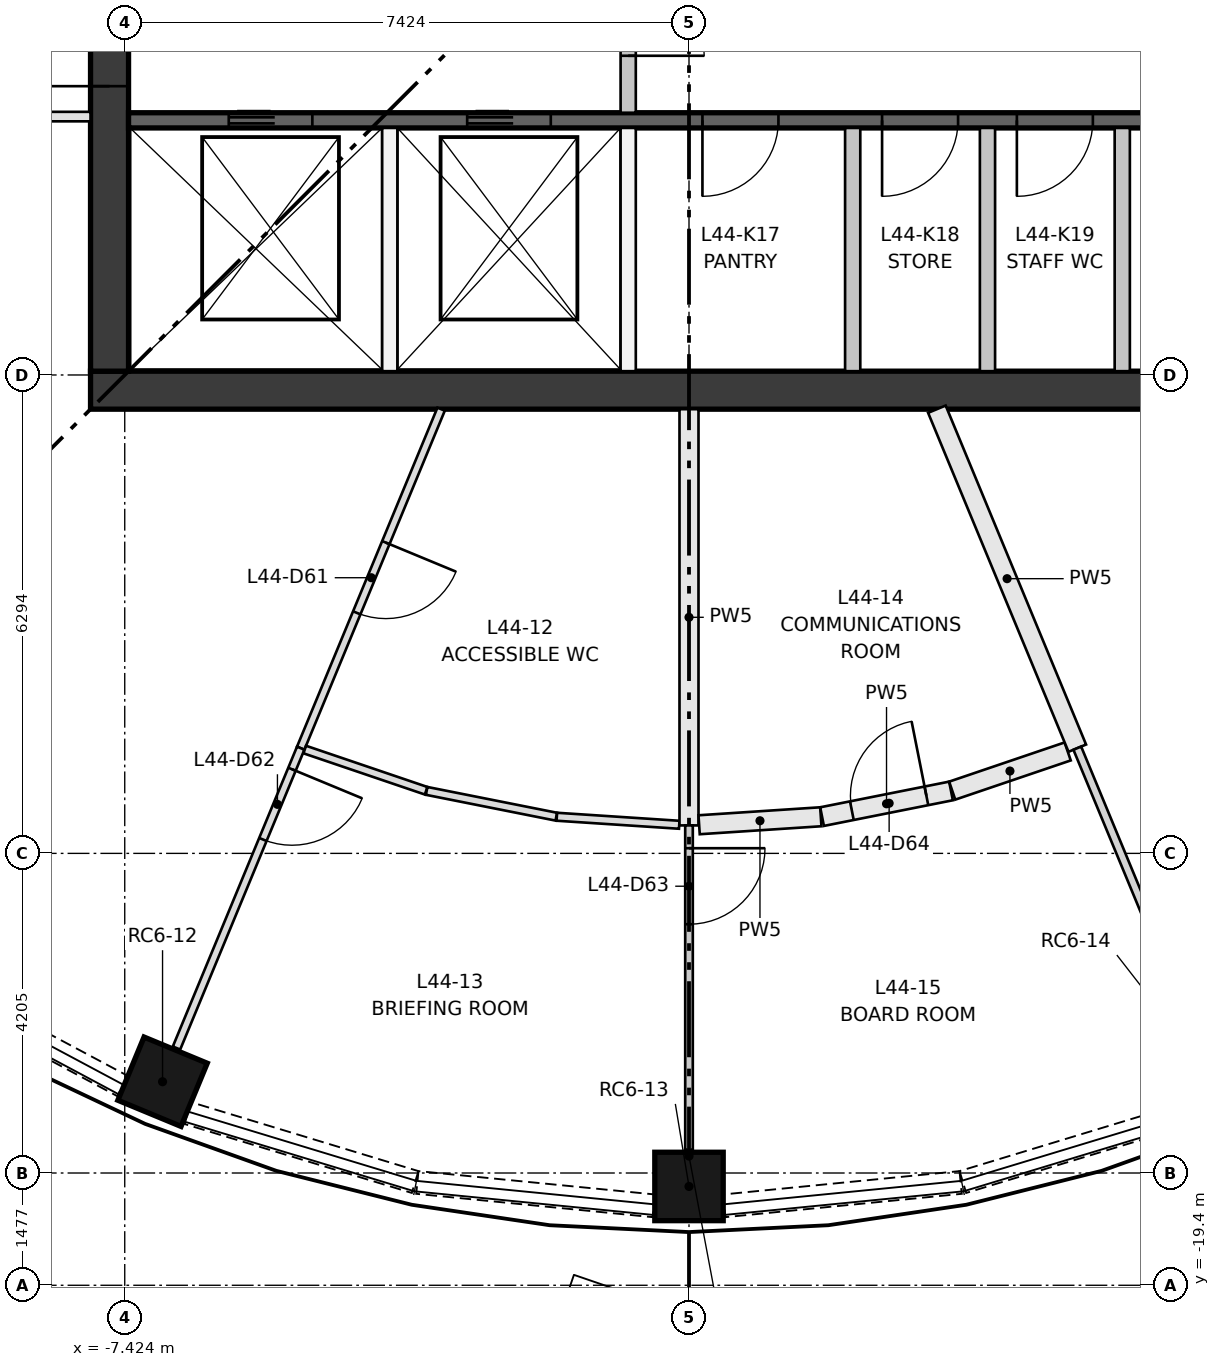
"""IFC4 building model, lengths in metres.
Left out: names, types, materials, properties, quantities, classifications, styles, units other than length and angle.
Written with IfcOpenShell. Run it as: python <this file> out.ifc"""

import sys

from ifc_helpers import new_model, si_unit, direction, frame, frame_2d, origin, origin_2d, place, context, subcontext, project, spatial, rectangle, extrude, element, fill, save


model = new_model("IFC4")
c1 = context("Model", 3, precision=1e-05, world=origin(), true_north=direction((0.0, 1.0)))
c2 = subcontext(c1, "Body", "Model", "MODEL_VIEW")
j1 = project(units=[si_unit("LENGTHUNIT", "METRE"), si_unit("PLANEANGLEUNIT", "RADIAN")], contexts=[c1])
p1 = place(None, origin())
s1 = spatial("IfcSite", under=j1, at=p1, CompositionType="ELEMENT")
p2 = place(p1, origin())
s2 = spatial("IfcBuilding", under=s1, at=p2, CompositionType="ELEMENT")
p3 = place(p2, frame((0.0, 0.0, 167.55)))
s3 = spatial("IfcBuildingStorey", under=s2, at=p3, CompositionType="ELEMENT", Elevation=167.55)
for number, where, z_axis, x_axis in (
    (1, (-6.927, -16.722, 0.0), (0.0, 0.0, 1.0), (-0.383, -0.924, 0.0)),
    (2, (0.0, -18.1, 0.0), (0.0, 0.0, 1.0), (0.0, -1.0, 0.0)),
):
    element("IfcColumn", number, at=place(p3, frame(where, z_axis=z_axis, x_axis=x_axis)), inside=s3, PredefinedType="COLUMN", context=c2, shape_type="SweptSolid", body=[
        extrude(rectangle(XDim=0.9, YDim=0.9, at=origin_2d()), origin(), (0.0, 0.0, 1.0), 3.35),
    ])
p4 = place(p3, frame((-7.874, -7.624, 0.0), z_axis=(0.0, 0.0, 1.0), x_axis=(1.0, 0.0, 0.0)))
e3 = element("IfcWall", 3, at=p4, inside=s3, PredefinedType="SHEAR", context=c2, shape_type="SweptSolid", body=[
    extrude(rectangle(XDim=15.748, YDim=0.5, at=frame_2d((7.874, 0.0))), origin(), (0.0, 0.0, 1.0), 3.35),
])
p5 = place(p3, frame((-7.624, -7.374, 0.0), z_axis=(0.0, 0.0, 1.0), x_axis=(0.0, 1.0, 0.0)))
e4 = element("IfcWall", 4, at=p5, inside=s3, PredefinedType="SHEAR", context=c2, shape_type="SweptSolid", body=[
    extrude(rectangle(XDim=14.748, YDim=0.5, at=frame_2d((7.374, 0.0))), origin(), (0.0, 0.0, 1.0), 3.35),
])
p6 = place(p5, frame((6.874, 0.0, 0.0)))
e5 = element("IfcOpeningElement", 5, at=p6, cuts=e4, PredefinedType="OPENING", context=c2, shape_type="SweptSolid", body=[
    extrude(rectangle(XDim=1.0, YDim=2.1, at=frame_2d((0.5, 1.05))), frame((0.0, 0.26, 0.0), z_axis=(0.0, -1.0, 0.0), x_axis=(1.0, 0.0, 0.0)), (0.0, 0.0, 1.0), 0.52),
])
p7 = place(p5, frame((3.75, 0.0, 0.0)))
e6 = element("IfcOpeningElement", 6, at=p7, cuts=e4, PredefinedType="OPENING", context=c2, shape_type="SweptSolid", body=[
    extrude(rectangle(XDim=1.8, YDim=2.1, at=frame_2d((0.9, 1.05))), frame((0.0, 0.26, 0.0), z_axis=(0.0, -1.0, 0.0), x_axis=(1.0, 0.0, 0.0)), (0.0, 0.0, 1.0), 0.52),
])
p8 = place(p5, frame((9.198, 0.0, 0.0)))
e7 = element("IfcOpeningElement", 7, at=p8, cuts=e4, PredefinedType="OPENING", context=c2, shape_type="SweptSolid", body=[
    extrude(rectangle(XDim=1.8, YDim=2.1, at=frame_2d((0.9, 1.05))), frame((0.0, 0.26, 0.0), z_axis=(0.0, -1.0, 0.0), x_axis=(1.0, 0.0, 0.0)), (0.0, 0.0, 1.0), 0.52),
])
p9 = place(p3, frame((-7.374, -4.074, 0.0), z_axis=(0.0, 0.0, 1.0), x_axis=(1.0, 0.0, 0.0)))
e8 = element("IfcWall", 8, at=p9, inside=s3, PredefinedType="SHEAR", context=c2, shape_type="SweptSolid", body=[
    extrude(rectangle(XDim=14.748, YDim=0.2, at=frame_2d((7.374, 0.0))), origin(), (0.0, 0.0, 1.0), 3.0),
])
p10 = place(p9, frame((1.319, 0.0, 0.0)))
e9 = element("IfcOpeningElement", 9, at=p10, cuts=e8, PredefinedType="OPENING", context=c2, shape_type="SweptSolid", body=[
    extrude(rectangle(XDim=1.1, YDim=2.1, at=frame_2d((0.55, 1.05))), frame((0.0, 0.11, 0.0), z_axis=(0.0, -1.0, 0.0), x_axis=(1.0, 0.0, 0.0)), (0.0, 0.0, 1.0), 0.22),
])
p11 = place(p9, frame((4.456, 0.0, 0.0)))
e10 = element("IfcOpeningElement", 10, at=p11, cuts=e8, PredefinedType="OPENING", context=c2, shape_type="SweptSolid", body=[
    extrude(rectangle(XDim=1.1, YDim=2.1, at=frame_2d((0.55, 1.05))), frame((0.0, 0.11, 0.0), z_axis=(0.0, -1.0, 0.0), x_axis=(1.0, 0.0, 0.0)), (0.0, 0.0, 1.0), 0.22),
])
p12 = place(p9, frame((7.551, 0.0, 0.0)))
e11 = element("IfcOpeningElement", 11, at=p12, cuts=e8, PredefinedType="OPENING", context=c2, shape_type="SweptSolid", body=[
    extrude(rectangle(XDim=1.0, YDim=2.1, at=frame_2d((0.5, 1.05))), frame((0.0, 0.11, 0.0), z_axis=(0.0, -1.0, 0.0), x_axis=(1.0, 0.0, 0.0)), (0.0, 0.0, 1.0), 0.22),
])
p13 = place(p9, frame((9.914, 0.0, 0.0)))
e12 = element("IfcOpeningElement", 12, at=p13, cuts=e8, PredefinedType="OPENING", context=c2, shape_type="SweptSolid", body=[
    extrude(rectangle(XDim=1.0, YDim=2.1, at=frame_2d((0.5, 1.05))), frame((0.0, 0.11, 0.0), z_axis=(0.0, -1.0, 0.0), x_axis=(1.0, 0.0, 0.0)), (0.0, 0.0, 1.0), 0.22),
])
p14 = place(p9, frame((11.688, 0.0, 0.0)))
e13 = element("IfcOpeningElement", 13, at=p14, cuts=e8, PredefinedType="OPENING", context=c2, shape_type="SweptSolid", body=[
    extrude(rectangle(XDim=1.0, YDim=2.1, at=frame_2d((0.5, 1.05))), frame((0.0, 0.11, 0.0), z_axis=(0.0, -1.0, 0.0), x_axis=(1.0, 0.0, 0.0)), (0.0, 0.0, 1.0), 0.22),
])
p15 = place(p9, frame((13.461, 0.0, 0.0)))
e14 = element("IfcOpeningElement", 14, at=p15, cuts=e8, PredefinedType="OPENING", context=c2, shape_type="SweptSolid", body=[
    extrude(rectangle(XDim=1.0, YDim=2.1, at=frame_2d((0.5, 1.05))), frame((0.0, 0.11, 0.0), z_axis=(0.0, -1.0, 0.0), x_axis=(1.0, 0.0, 0.0)), (0.0, 0.0, 1.0), 0.22),
])
for number, where, z_axis, x_axis in (
    (15, (-3.937, -7.374, 0.0), (0.0, 0.0, 1.0), (0.0, 1.0, 0.0)),
    (16, (-0.8, -7.374, 0.0), (0.0, 0.0, 1.0), (0.0, 1.0, 0.0)),
):
    element("IfcWall", number, at=place(p3, frame(where, z_axis=z_axis, x_axis=x_axis)), inside=s3, PredefinedType="PARTITIONING", context=c2, shape_type="SweptSolid", body=[
        extrude(rectangle(XDim=3.2, YDim=0.2, at=frame_2d((1.6, 0.0))), origin(), (0.0, 0.0, 1.0), 3.0),
    ])
p16 = place(p3, frame((-0.8, -3.974, 0.0), z_axis=(0.0, 0.0, 1.0), x_axis=(0.0, 1.0, 0.0)))
e17 = element("IfcWall", 17, at=p16, inside=s3, PredefinedType="PARTITIONING", context=c2, shape_type="SweptSolid", body=[
    extrude(rectangle(XDim=2.499, YDim=0.2, at=frame_2d((1.25, 0.0))), origin(), (0.0, 0.0, 1.0), 3.0),
])
p17 = place(p16, frame((0.75, 0.0, 0.0)))
e18 = element("IfcOpeningElement", 18, at=p17, cuts=e17, PredefinedType="OPENING", context=c2, shape_type="SweptSolid", body=[
    extrude(rectangle(XDim=1.0, YDim=2.1, at=frame_2d((0.5, 1.05))), frame((0.0, 0.11, 0.0), z_axis=(0.0, -1.0, 0.0), x_axis=(1.0, 0.0, 0.0)), (0.0, 0.0, 1.0), 0.22),
])
for number, where, z_axis, x_axis in (
    (19, (2.154, -7.374, 0.0), (0.0, 0.0, 1.0), (0.0, 1.0, 0.0)),
    (20, (3.927, -7.374, 0.0), (0.0, 0.0, 1.0), (0.0, 1.0, 0.0)),
    (21, (5.7, -7.374, 0.0), (0.0, 0.0, 1.0), (0.0, 1.0, 0.0)),
):
    element("IfcWall", number, at=place(p3, frame(where, z_axis=z_axis, x_axis=x_axis)), inside=s3, PredefinedType="PARTITIONING", context=c2, shape_type="SweptSolid", body=[
        extrude(rectangle(XDim=3.2, YDim=0.2, at=frame_2d((1.6, 0.0))), origin(), (0.0, 0.0, 1.0), 3.0),
    ])
p18 = place(p3, frame((-10.209, -15.306, 0.0), z_axis=(0.0, 0.0, 1.0), x_axis=(0.882024038027, -0.47120441036, 0.0)))
e22 = element("IfcWall", 22, at=p18, inside=s3, PredefinedType="SOLIDWALL", context=c2, shape_type="SweptSolid", body=[
    extrude(rectangle(XDim=3.125, YDim=0.3, at=frame_2d((1.562, 0.0))), origin(), (0.0, 0.0, 1.0), 0.9),
])
p19 = place(p3, frame((-6.596, -17.135, 0.0), z_axis=(0.0, 0.0, 1.0), x_axis=(0.957001416136, -0.290083245834, 0.0)))
e23 = element("IfcWall", 23, at=p19, inside=s3, PredefinedType="SOLIDWALL", context=c2, shape_type="SweptSolid", body=[
    extrude(rectangle(XDim=3.127, YDim=0.3, at=frame_2d((1.563, 0.0))), origin(), (0.0, 0.0, 1.0), 0.9),
])
for number, where, z_axis, x_axis in (
    (24, (-3.574, -18.048, 0.0), (0.0, 0.0, 1.0), (0.995, -0.098, 0.0)),
    (25, (0.464, -18.354, 0.0), (0.0, 0.0, 1.0), (0.995, 0.098, 0.0)),
):
    element("IfcWall", number, at=place(p3, frame(where, z_axis=z_axis, x_axis=x_axis)), inside=s3, PredefinedType="SOLIDWALL", context=c2, shape_type="SweptSolid", body=[
        extrude(rectangle(XDim=3.125, YDim=0.3, at=frame_2d((1.563, 0.0))), origin(), (0.0, 0.0, 1.0), 0.9),
    ])
p20 = place(p3, frame((3.604, -18.042, 0.0), z_axis=(0.0, 0.0, 1.0), x_axis=(0.957001416136, 0.290083245834, 0.0)))
e26 = element("IfcWall", 26, at=p20, inside=s3, PredefinedType="SOLIDWALL", context=c2, shape_type="SweptSolid", body=[
    extrude(rectangle(XDim=3.127, YDim=0.3, at=frame_2d((1.563, 0.0))), origin(), (0.0, 0.0, 1.0), 0.9),
])
p21 = place(p3, frame((-7.874, -4.024, 0.0), z_axis=(0.0, 0.0, 1.0), x_axis=(-1.0, 0.0, 0.0)))
e27 = element("IfcWall", 27, at=p21, inside=s3, PredefinedType="PARTITIONING", context=c2, shape_type="SweptSolid", body=[
    extrude(rectangle(XDim=4.53, YDim=0.125, at=frame_2d((2.265, 0.0))), origin(), (0.0, 0.0, 1.0), 3.0),
])
p22 = place(p21, frame((1.0, 0.0, 0.0)))
e28 = element("IfcOpeningElement", 28, at=p22, cuts=e27, PredefinedType="OPENING", context=c2, shape_type="SweptSolid", body=[
    extrude(rectangle(XDim=1.8, YDim=2.1, at=frame_2d((0.9, 1.05))), frame((0.0, 0.073, 0.0), z_axis=(0.0, -1.0, 0.0), x_axis=(1.0, 0.0, 0.0)), (0.0, 0.0, 1.0), 0.145),
])
p23 = place(p3, frame((-3.261, -7.874, 0.0), z_axis=(0.0, 0.0, 1.0), x_axis=(-0.382707643949, -0.923869503373, 0.0)))
e29 = element("IfcWall", 29, at=p23, inside=s3, PredefinedType="PARTITIONING", context=c2, shape_type="SweptSolid", body=[
    extrude(rectangle(XDim=4.827, YDim=0.105, at=frame_2d((2.414, 0.0))), origin(), (0.0, 0.0, 1.0), 3.0),
])
p24 = place(p23, frame((1.9, 0.0, 0.0)))
e30 = element("IfcOpeningElement", 30, at=p24, cuts=e29, PredefinedType="OPENING", context=c2, shape_type="SweptSolid", body=[
    extrude(rectangle(XDim=1.0, YDim=2.1, at=frame_2d((0.5, 1.05))), frame((0.0, 0.062, 0.0), z_axis=(0.0, -1.0, 0.0), x_axis=(1.0, 0.0, 0.0)), (0.0, 0.0, 1.0), 0.125),
])
p25 = place(p3, frame((-5.109, -12.334, 0.0), z_axis=(0.0, 0.0, 1.0), x_axis=(-0.382669916503, -0.923885130849, 0.0)))
e31 = element("IfcWall", 31, at=p25, inside=s3, PredefinedType="PARTITIONING", context=c2, shape_type="SweptSolid", body=[
    extrude(rectangle(XDim=4.27, YDim=0.105, at=frame_2d((2.135, 0.0))), origin(), (0.0, 0.0, 1.0), 3.0),
])
p26 = place(p25, frame((0.3, 0.0, 0.0)))
e32 = element("IfcOpeningElement", 32, at=p26, cuts=e31, PredefinedType="OPENING", context=c2, shape_type="SweptSolid", body=[
    extrude(rectangle(XDim=1.0, YDim=2.1, at=frame_2d((0.5, 1.05))), frame((0.0, 0.062, 0.0), z_axis=(0.0, -1.0, 0.0), x_axis=(1.0, 0.0, 0.0)), (0.0, 0.0, 1.0), 0.125),
])
p27 = place(p3, frame((-3.458, -12.894, 0.0), z_axis=(0.0, 0.0, 1.0), x_axis=(-0.946917341597, 0.321477134773, 0.0)))
e33 = element("IfcWall", 33, at=p27, inside=s3, PredefinedType="PARTITIONING", context=c2, shape_type="SweptSolid", body=[
    extrude(rectangle(XDim=1.687, YDim=0.105, at=frame_2d((0.843, 0.0))), origin(), (0.0, 0.0, 1.0), 3.0),
])
p28 = place(p3, frame((-1.746, -13.235, 0.0), z_axis=(0.0, 0.0, 1.0), x_axis=(-0.980785270285, 0.195090372882, 0.0)))
e34 = element("IfcWall", 34, at=p28, inside=s3, PredefinedType="PARTITIONING", context=c2, shape_type="SweptSolid", body=[
    extrude(rectangle(XDim=1.74, YDim=0.105, at=frame_2d((0.87, 0.0))), origin(), (0.0, 0.0, 1.0), 3.0),
])
p29 = place(p3, frame((-0.128, -13.342, 0.0), z_axis=(0.0, 0.0, 1.0), x_axis=(-0.997862773684, 0.065344356258, 0.0)))
e35 = element("IfcWall", 35, at=p29, inside=s3, PredefinedType="PARTITIONING", context=c2, shape_type="SweptSolid", body=[
    extrude(rectangle(XDim=1.614, YDim=0.105, at=frame_2d((0.807, 0.0))), origin(), (0.0, 0.0, 1.0), 3.0),
])
p30 = place(p3, frame((0.0, -7.874, 0.0), z_axis=(0.0, 0.0, 1.0), x_axis=(0.0, -1.0, 0.0)))
e36 = element("IfcWall", 36, at=p30, inside=s3, PredefinedType="PARTITIONING", context=c2, shape_type="SweptSolid", body=[
    extrude(rectangle(XDim=5.476, YDim=0.25, at=frame_2d((2.738, 0.0))), origin(), (0.0, 0.0, 1.0), 3.0),
])
p31 = place(p3, frame((0.0, -13.35, 0.0), z_axis=(0.0, 0.0, 1.0), x_axis=(0.0, -1.0, 0.0)))
e37 = element("IfcWall", 37, at=p31, inside=s3, PredefinedType="PARTITIONING", context=c2, shape_type="SweptSolid", body=[
    extrude(rectangle(XDim=4.27, YDim=0.1, at=frame_2d((2.135, 0.0))), origin(), (0.0, 0.0, 1.0), 3.0),
])
p32 = place(p31, frame((0.3, 0.0, 0.0)))
e38 = element("IfcOpeningElement", 38, at=p32, cuts=e37, PredefinedType="OPENING", context=c2, shape_type="SweptSolid", body=[
    extrude(rectangle(XDim=1.0, YDim=2.1, at=frame_2d((0.5, 1.05))), frame((0.0, 0.06, 0.0), z_axis=(0.0, -1.0, 0.0), x_axis=(1.0, 0.0, 0.0)), (0.0, 0.0, 1.0), 0.12),
])
p33 = place(p3, frame((1.734, -13.236, 0.0), z_axis=(0.0, 0.0, 1.0), x_axis=(-0.997857274773, -0.065428275107, 0.0)))
e39 = element("IfcWall", 39, at=p33, inside=s3, PredefinedType="PARTITIONING", context=c2, shape_type="SweptSolid", body=[
    extrude(rectangle(XDim=1.604, YDim=0.25, at=frame_2d((0.802, 0.0))), origin(), (0.0, 0.0, 1.0), 3.0),
])
p34 = place(p3, frame((1.75, -13.234, 0.0), z_axis=(0.0, 0.0, 1.0), x_axis=(0.98079718542, 0.195030461907, 0.0)))
e40 = element("IfcWall", 40, at=p34, inside=s3, PredefinedType="PARTITIONING", context=c2, shape_type="SweptSolid", body=[
    extrude(rectangle(XDim=1.73, YDim=0.25, at=frame_2d((0.865, 0.0))), origin(), (0.0, 0.0, 1.0), 3.0),
])
p35 = place(p34, frame((0.4, 0.0, 0.0)))
e41 = element("IfcOpeningElement", 41, at=p35, cuts=e40, PredefinedType="OPENING", context=c2, shape_type="SweptSolid", body=[
    extrude(rectangle(XDim=1.0, YDim=2.1, at=frame_2d((0.5, 1.05))), frame((0.0, 0.135, 0.0), z_axis=(0.0, -1.0, 0.0), x_axis=(1.0, 0.0, 0.0)), (0.0, 0.0, 1.0), 0.27),
])
p36 = place(p3, frame((4.982, -12.377, 0.0), z_axis=(0.0, 0.0, 1.0), x_axis=(-0.946919168061, -0.321471754838, 0.0)))
e42 = element("IfcWall", 42, at=p36, inside=s3, PredefinedType="PARTITIONING", context=c2, shape_type="SweptSolid", body=[
    extrude(rectangle(XDim=1.605, YDim=0.25, at=frame_2d((0.802, 0.0))), origin(), (0.0, 0.0, 1.0), 3.0),
])
p37 = place(p3, frame((3.261, -7.874, 0.0), z_axis=(0.0, 0.0, 1.0), x_axis=(0.382707643949, -0.923869503373, 0.0)))
e43 = element("IfcWall", 43, at=p37, inside=s3, PredefinedType="PARTITIONING", context=c2, shape_type="SweptSolid", body=[
    extrude(rectangle(XDim=4.827, YDim=0.25, at=frame_2d((2.414, 0.0))), origin(), (0.0, 0.0, 1.0), 3.0),
])
p38 = place(p3, frame((5.109, -12.334, 0.0), z_axis=(0.0, 0.0, 1.0), x_axis=(0.382669916503, -0.923885130849, 0.0)))
e44 = element("IfcWall", 44, at=p38, inside=s3, PredefinedType="PARTITIONING", context=c2, shape_type="SweptSolid", body=[
    extrude(rectangle(XDim=4.27, YDim=0.11, at=frame_2d((2.135, 0.0))), origin(), (0.0, 0.0, 1.0), 3.0),
])
p39 = place(p10, origin())
e45 = element("IfcDoor", 45, at=p39, inside=s3, OperationType="DOUBLE_DOOR_SLIDING", PredefinedType="DOOR", context=c2, shape_type="SweptSolid", body=[
    extrude(rectangle(XDim=1.1, YDim=2.1, at=frame_2d((0.55, 1.05))), frame((0.0, 0.025, 0.0), z_axis=(0.0, -1.0, 0.0), x_axis=(1.0, 0.0, 0.0)), (0.0, 0.0, 1.0), 0.05),
])
fill(e9, e45)
p40 = place(p11, origin())
e46 = element("IfcDoor", 46, at=p40, inside=s3, OperationType="DOUBLE_DOOR_SLIDING", PredefinedType="DOOR", context=c2, shape_type="SweptSolid", body=[
    extrude(rectangle(XDim=1.1, YDim=2.1, at=frame_2d((0.55, 1.05))), frame((0.0, 0.025, 0.0), z_axis=(0.0, -1.0, 0.0), x_axis=(1.0, 0.0, 0.0)), (0.0, 0.0, 1.0), 0.05),
])
fill(e10, e46)
p41 = place(p17, frame((1.0, 0.0, 0.0), z_axis=(0.0, 0.0, 1.0), x_axis=(-1.0, 0.0, 0.0)))
e47 = element("IfcDoor", 47, at=p41, inside=s3, OperationType="SINGLE_SWING_LEFT", PredefinedType="DOOR", context=c2, shape_type="SweptSolid", body=[
    extrude(rectangle(XDim=1.0, YDim=2.1, at=frame_2d((0.5, 1.05))), frame((0.0, 0.025, 0.0), z_axis=(0.0, -1.0, 0.0), x_axis=(1.0, 0.0, 0.0)), (0.0, 0.0, 1.0), 0.05),
])
fill(e18, e47)
p42 = place(p12, frame((1.0, 0.0, 0.0), z_axis=(0.0, 0.0, 1.0), x_axis=(-1.0, 0.0, 0.0)))
e48 = element("IfcDoor", 48, at=p42, inside=s3, OperationType="SINGLE_SWING_LEFT", PredefinedType="DOOR", context=c2, shape_type="SweptSolid", body=[
    extrude(rectangle(XDim=1.0, YDim=2.1, at=frame_2d((0.5, 1.05))), frame((0.0, 0.025, 0.0), z_axis=(0.0, -1.0, 0.0), x_axis=(1.0, 0.0, 0.0)), (0.0, 0.0, 1.0), 0.05),
])
fill(e11, e48)
p43 = place(p13, frame((1.0, 0.0, 0.0), z_axis=(0.0, 0.0, 1.0), x_axis=(-1.0, 0.0, 0.0)))
e49 = element("IfcDoor", 49, at=p43, inside=s3, OperationType="SINGLE_SWING_LEFT", PredefinedType="DOOR", context=c2, shape_type="SweptSolid", body=[
    extrude(rectangle(XDim=1.0, YDim=2.1, at=frame_2d((0.5, 1.05))), frame((0.0, 0.025, 0.0), z_axis=(0.0, -1.0, 0.0), x_axis=(1.0, 0.0, 0.0)), (0.0, 0.0, 1.0), 0.05),
])
fill(e12, e49)
p44 = place(p14, frame((1.0, 0.0, 0.0), z_axis=(0.0, 0.0, 1.0), x_axis=(-1.0, 0.0, 0.0)))
e50 = element("IfcDoor", 50, at=p44, inside=s3, OperationType="SINGLE_SWING_LEFT", PredefinedType="DOOR", context=c2, shape_type="SweptSolid", body=[
    extrude(rectangle(XDim=1.0, YDim=2.1, at=frame_2d((0.5, 1.05))), frame((0.0, 0.025, 0.0), z_axis=(0.0, -1.0, 0.0), x_axis=(1.0, 0.0, 0.0)), (0.0, 0.0, 1.0), 0.05),
])
fill(e13, e50)
p45 = place(p7, origin())
e51 = element("IfcDoor", 51, at=p45, inside=s3, OperationType="DOUBLE_DOOR_SINGLE_SWING", PredefinedType="DOOR", context=c2, shape_type="SweptSolid", body=[
    extrude(rectangle(XDim=1.8, YDim=2.1, at=frame_2d((0.9, 1.05))), frame((0.0, 0.025, 0.0), z_axis=(0.0, -1.0, 0.0), x_axis=(1.0, 0.0, 0.0)), (0.0, 0.0, 1.0), 0.05),
])
fill(e6, e51)
p46 = place(p24, origin())
e52 = element("IfcDoor", 52, at=p46, inside=s3, OperationType="SINGLE_SWING_LEFT", PredefinedType="DOOR", context=c2, shape_type="SweptSolid", body=[
    extrude(rectangle(XDim=1.0, YDim=2.1, at=frame_2d((0.5, 1.05))), frame((0.0, 0.025, 0.0), z_axis=(0.0, -1.0, 0.0), x_axis=(1.0, 0.0, 0.0)), (0.0, 0.0, 1.0), 0.05),
])
fill(e30, e52)
p47 = place(p26, origin())
e53 = element("IfcDoor", 53, at=p47, inside=s3, OperationType="SINGLE_SWING_LEFT", PredefinedType="DOOR", context=c2, shape_type="SweptSolid", body=[
    extrude(rectangle(XDim=1.0, YDim=2.1, at=frame_2d((0.5, 1.05))), frame((0.0, 0.025, 0.0), z_axis=(0.0, -1.0, 0.0), x_axis=(1.0, 0.0, 0.0)), (0.0, 0.0, 1.0), 0.05),
])
fill(e32, e53)
p48 = place(p32, origin())
e54 = element("IfcDoor", 54, at=p48, inside=s3, OperationType="SINGLE_SWING_LEFT", PredefinedType="DOOR", context=c2, shape_type="SweptSolid", body=[
    extrude(rectangle(XDim=1.0, YDim=2.1, at=frame_2d((0.5, 1.05))), frame((0.0, 0.025, 0.0), z_axis=(0.0, -1.0, 0.0), x_axis=(1.0, 0.0, 0.0)), (0.0, 0.0, 1.0), 0.05),
])
fill(e38, e54)
p49 = place(p35, origin())
e55 = element("IfcDoor", 55, at=p49, inside=s3, OperationType="SINGLE_SWING_RIGHT", PredefinedType="DOOR", context=c2, shape_type="SweptSolid", body=[
    extrude(rectangle(XDim=1.0, YDim=2.1, at=frame_2d((0.5, 1.05))), frame((0.0, 0.025, 0.0), z_axis=(0.0, -1.0, 0.0), x_axis=(1.0, 0.0, 0.0)), (0.0, 0.0, 1.0), 0.05),
])
fill(e41, e55)
save(model, sys.argv[1])
